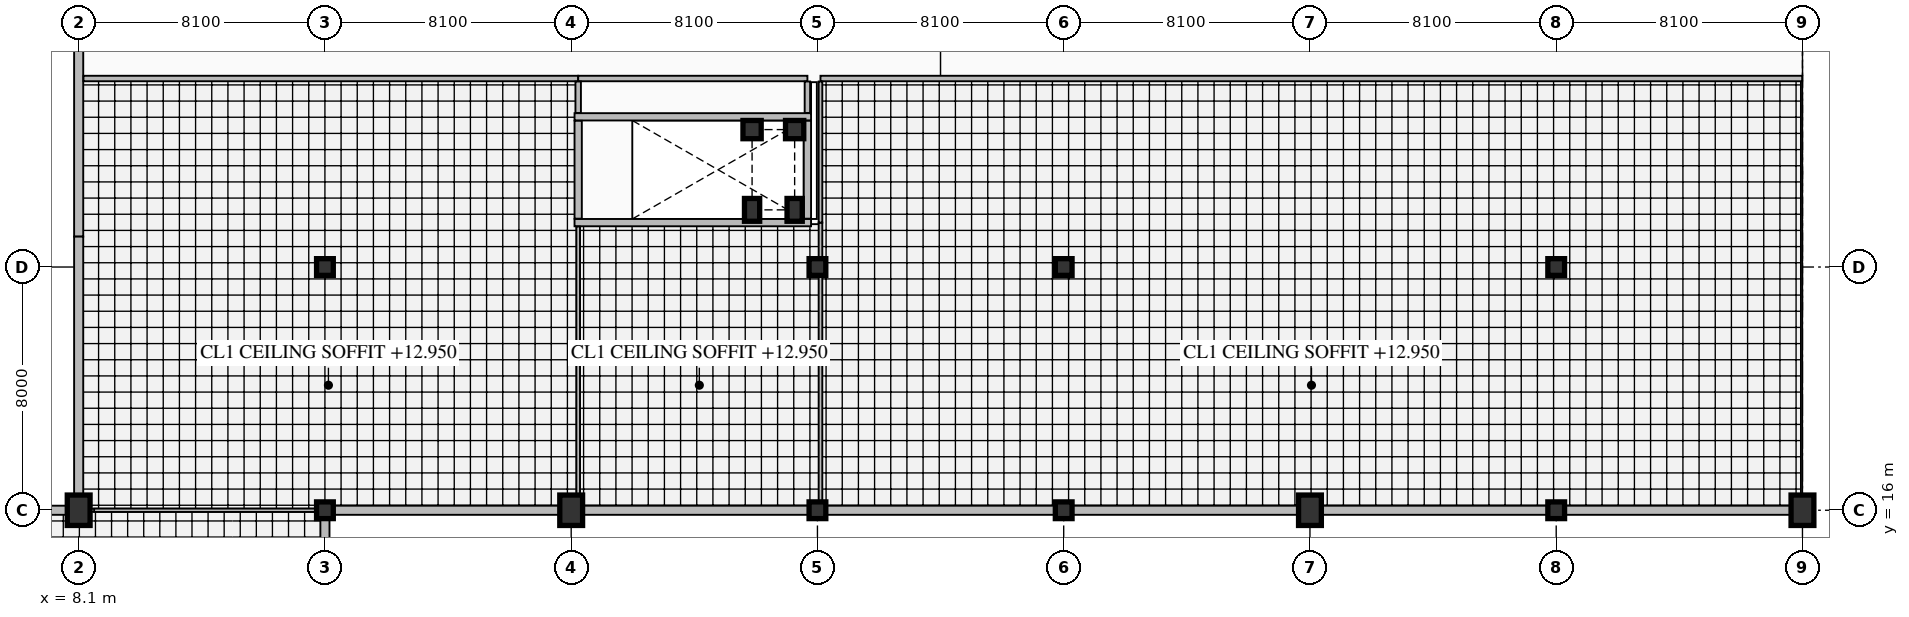
"""IFC4 building model, lengths in metres.
Left out: names, types, materials, properties, quantities, classifications, styles, units other than length and angle.
Written with IfcOpenShell. Run it as: python <this file> out.ifc"""

import sys

from ifc_helpers import new_model, si_unit, direction, frame, frame_2d, origin, origin_2d, place, context, subcontext, project, spatial, rectangle, extrude, element, fill, save


model = new_model("IFC4")
c1 = context("Model", 3, precision=1e-05, world=origin(), true_north=direction((0.0, 1.0)))
c2 = subcontext(c1, "Body", "Model", "MODEL_VIEW")
j1 = project(units=[si_unit("LENGTHUNIT", "METRE"), si_unit("PLANEANGLEUNIT", "RADIAN")], contexts=[c1])
p1 = place(None, origin())
s1 = spatial("IfcSite", under=j1, at=p1, CompositionType="ELEMENT")
p2 = place(p1, origin())
s2 = spatial("IfcBuilding", under=s1, at=p2, CompositionType="ELEMENT")
p3 = place(p2, frame((0.0, 0.0, 10.2)))
s3 = spatial("IfcBuildingStorey", under=s2, at=p3, CompositionType="ELEMENT", Elevation=10.2)
p4 = place(p3, frame((8.1, 16.0, 0.0), z_axis=(0.0, 0.0, 1.0), x_axis=(1.0, 0.0, 0.0)))
e1 = element("IfcColumn", 1, at=p4, inside=s3, PredefinedType="COLUMN", context=c2, shape_type="SweptSolid", body=[
    extrude(rectangle(XDim=0.75, YDim=1.0, at=origin_2d()), origin(), (0.0, 0.0, 1.0), 4.5),
])
for number, where, z_axis, x_axis in (
    (2, (16.2, 16.0, 0.0), (0.0, 0.0, 1.0), (1.0, 0.0, 0.0)),
    (3, (16.2, 24.0, 0.0), (0.0, 0.0, 1.0), (1.0, 0.0, 0.0)),
):
    element("IfcColumn", number, at=place(p3, frame(where, z_axis=z_axis, x_axis=x_axis)), inside=s3, PredefinedType="COLUMN", context=c2, shape_type="SweptSolid", body=[
        extrude(rectangle(XDim=0.55, YDim=0.55, at=origin_2d()), origin(), (0.0, 0.0, 1.0), 4.24),
    ])
p5 = place(p3, frame((24.3, 16.0, 0.0), z_axis=(0.0, 0.0, 1.0), x_axis=(1.0, 0.0, 0.0)))
e4 = element("IfcColumn", 4, at=p5, inside=s3, PredefinedType="COLUMN", context=c2, shape_type="SweptSolid", body=[
    extrude(rectangle(XDim=0.75, YDim=1.0, at=origin_2d()), origin(), (0.0, 0.0, 1.0), 4.5),
])
p6 = place(p3, frame((30.25, 25.88, 0.0), z_axis=(0.0, 0.0, 1.0), x_axis=(1.0, 0.0, 0.0)))
e5 = element("IfcColumn", 5, at=p6, inside=s3, PredefinedType="COLUMN", context=c2, shape_type="SweptSolid", body=[
    extrude(rectangle(XDim=0.5, YDim=0.75, at=origin_2d()), origin(), (0.0, 0.0, 1.0), 4.5),
])
p7 = place(p3, frame((30.25, 28.52, 0.0), z_axis=(0.0, 0.0, 1.0), x_axis=(1.0, 0.0, 0.0)))
e6 = element("IfcColumn", 6, at=p7, inside=s3, PredefinedType="COLUMN", context=c2, shape_type="SweptSolid", body=[
    extrude(rectangle(XDim=0.6, YDim=0.6, at=origin_2d()), origin(), (0.0, 0.0, 1.0), 4.5),
])
p8 = place(p3, frame((31.65, 25.88, 0.0), z_axis=(0.0, 0.0, 1.0), x_axis=(1.0, 0.0, 0.0)))
e7 = element("IfcColumn", 7, at=p8, inside=s3, PredefinedType="COLUMN", context=c2, shape_type="SweptSolid", body=[
    extrude(rectangle(XDim=0.5, YDim=0.75, at=origin_2d()), origin(), (0.0, 0.0, 1.0), 4.5),
])
p9 = place(p3, frame((31.65, 28.52, 0.0), z_axis=(0.0, 0.0, 1.0), x_axis=(1.0, 0.0, 0.0)))
e8 = element("IfcColumn", 8, at=p9, inside=s3, PredefinedType="COLUMN", context=c2, shape_type="SweptSolid", body=[
    extrude(rectangle(XDim=0.6, YDim=0.6, at=origin_2d()), origin(), (0.0, 0.0, 1.0), 4.5),
])
for number, where, z_axis, x_axis in (
    (9, (32.4, 16.0, 0.0), (0.0, 0.0, 1.0), (1.0, 0.0, 0.0)),
    (10, (32.4, 24.0, 0.0), (0.0, 0.0, 1.0), (1.0, 0.0, 0.0)),
    (11, (40.5, 16.0, 0.0), (0.0, 0.0, 1.0), (1.0, 0.0, 0.0)),
    (12, (40.5, 24.0, 0.0), (0.0, 0.0, 1.0), (1.0, 0.0, 0.0)),
):
    element("IfcColumn", number, at=place(p3, frame(where, z_axis=z_axis, x_axis=x_axis)), inside=s3, PredefinedType="COLUMN", context=c2, shape_type="SweptSolid", body=[
        extrude(rectangle(XDim=0.55, YDim=0.55, at=origin_2d()), origin(), (0.0, 0.0, 1.0), 4.24),
    ])
p10 = place(p3, frame((48.6, 16.0, 0.0), z_axis=(0.0, 0.0, 1.0), x_axis=(1.0, 0.0, 0.0)))
e13 = element("IfcColumn", 13, at=p10, inside=s3, PredefinedType="COLUMN", context=c2, shape_type="SweptSolid", body=[
    extrude(rectangle(XDim=0.75, YDim=1.0, at=origin_2d()), origin(), (0.0, 0.0, 1.0), 4.5),
])
for number, where, z_axis, x_axis in (
    (14, (56.7, 16.0, 0.0), (0.0, 0.0, 1.0), (1.0, 0.0, 0.0)),
    (15, (56.7, 24.0, 0.0), (0.0, 0.0, 1.0), (1.0, 0.0, 0.0)),
):
    element("IfcColumn", number, at=place(p3, frame(where, z_axis=z_axis, x_axis=x_axis)), inside=s3, PredefinedType="COLUMN", context=c2, shape_type="SweptSolid", body=[
        extrude(rectangle(XDim=0.55, YDim=0.55, at=origin_2d()), origin(), (0.0, 0.0, 1.0), 4.24),
    ])
p11 = place(p3, frame((64.8, 16.0, 0.0), z_axis=(0.0, 0.0, 1.0), x_axis=(1.0, 0.0, 0.0)))
e16 = element("IfcColumn", 16, at=p11, inside=s3, PredefinedType="COLUMN", context=c2, shape_type="SweptSolid", body=[
    extrude(rectangle(XDim=0.75, YDim=1.0, at=origin_2d()), origin(), (0.0, 0.0, 1.0), 4.5),
])
p12 = place(p3, frame((16.2, 0.0, 0.0), z_axis=(0.0, 0.0, 1.0), x_axis=(0.0, 1.0, 0.0)))
e17 = element("IfcWall", 17, at=p12, inside=s3, PredefinedType="SOLIDWALL", context=c2, shape_type="SweptSolid", body=[
    extrude(rectangle(XDim=16.0, YDim=0.3, at=frame_2d((8.0, 0.0))), origin(), (0.0, 0.0, 1.0), 3.769),
])
p13 = place(p3, frame((16.2, 16.0, 0.0), z_axis=(0.0, 0.0, 1.0), x_axis=(1.0, 0.0, 0.0)))
e18 = element("IfcWall", 18, at=p13, inside=s3, PredefinedType="SOLIDWALL", context=c2, shape_type="SweptSolid", body=[
    extrude(rectangle(XDim=16.2, YDim=0.3, at=frame_2d((8.1, 0.0))), origin(), (0.0, 0.0, 1.0), 3.544),
])
p14 = place(p3, frame((32.4, 16.0, 0.0), z_axis=(0.0, 0.0, 1.0), x_axis=(1.0, 0.0, 0.0)))
e19 = element("IfcWall", 19, at=p14, inside=s3, PredefinedType="SOLIDWALL", context=c2, shape_type="SweptSolid", body=[
    extrude(rectangle(XDim=16.2, YDim=0.3, at=frame_2d((8.1, 0.0))), origin(), (0.0, 0.0, 1.0), 3.544),
])
p15 = place(p3, frame((48.6, 16.0, 0.0), z_axis=(0.0, 0.0, 1.0), x_axis=(1.0, 0.0, 0.0)))
e20 = element("IfcWall", 20, at=p15, inside=s3, PredefinedType="SOLIDWALL", context=c2, shape_type="SweptSolid", body=[
    extrude(rectangle(XDim=16.2, YDim=0.3, at=frame_2d((8.1, 0.0))), origin(), (0.0, 0.0, 1.0), 3.62),
])
p16 = place(p3, frame((8.1, 34.0, 0.0), z_axis=(0.0, 0.0, 1.0), x_axis=(0.0, -1.0, 0.0)))
e21 = element("IfcWall", 21, at=p16, inside=s3, PredefinedType="SOLIDWALL", context=c2, shape_type="SweptSolid", body=[
    extrude(rectangle(XDim=9.0, YDim=0.3, at=frame_2d((4.5, 0.0))), origin(), (0.0, 0.0, 1.0), 3.366),
])
p17 = place(p16, frame((4.95, 0.0, 0.95)))
e22 = element("IfcOpeningElement", 22, at=p17, cuts=e21, PredefinedType="OPENING", context=c2, shape_type="SweptSolid", body=[
    extrude(rectangle(XDim=2.1, YDim=1.8, at=frame_2d((1.05, 0.9))), frame((0.0, 0.16, 0.0), z_axis=(0.0, -1.0, 0.0), x_axis=(1.0, 0.0, 0.0)), (0.0, 0.0, 1.0), 0.32),
])
p18 = place(p3, frame((8.1, 25.0, 0.0), z_axis=(0.0, 0.0, 1.0), x_axis=(0.0, -1.0, 0.0)))
e23 = element("IfcWall", 23, at=p18, inside=s3, PredefinedType="SOLIDWALL", context=c2, shape_type="SweptSolid", body=[
    extrude(rectangle(XDim=9.0, YDim=0.3, at=frame_2d((4.5, 0.0))), origin(), (0.0, 0.0, 1.0), 3.366),
])
p19 = place(p18, frame((3.6, 0.0, 0.95)))
e24 = element("IfcOpeningElement", 24, at=p19, cuts=e23, PredefinedType="OPENING", context=c2, shape_type="SweptSolid", body=[
    extrude(rectangle(XDim=2.25, YDim=1.8, at=frame_2d((1.125, 0.9))), frame((0.0, 0.16, 0.0), z_axis=(0.0, -1.0, 0.0), x_axis=(1.0, 0.0, 0.0)), (0.0, 0.0, 1.0), 0.32),
])
p20 = place(p3, frame((8.1, 16.0, 0.0), z_axis=(0.0, 0.0, 1.0), x_axis=(-1.0, 0.0, 0.0)))
e25 = element("IfcWall", 25, at=p20, inside=s3, PredefinedType="SOLIDWALL", context=c2, shape_type="SweptSolid", body=[
    extrude(rectangle(XDim=8.1, YDim=0.3, at=frame_2d((4.05, 0.0))), origin(), (0.0, 0.0, 1.0), 3.619),
])
p21 = place(p20, frame((2.7, 0.0, 0.95)))
e26 = element("IfcOpeningElement", 26, at=p21, cuts=e25, PredefinedType="OPENING", context=c2, shape_type="SweptSolid", body=[
    extrude(rectangle(XDim=2.4, YDim=1.6, at=frame_2d((1.2, 0.8))), frame((0.0, 0.16, 0.0), z_axis=(0.0, -1.0, 0.0), x_axis=(1.0, 0.0, 0.0)), (0.0, 0.0, 1.0), 0.32),
])
p22 = place(p3, frame((24.41, 25.46, 0.0), z_axis=(0.0, 0.0, 1.0), x_axis=(1.0, 0.0, 0.0)))
e27 = element("IfcWall", 27, at=p22, inside=s3, PredefinedType="PARTITIONING", context=c2, shape_type="SweptSolid", body=[
    extrude(rectangle(XDim=7.78, YDim=0.24, at=frame_2d((3.89, 0.0))), origin(), (0.0, 0.0, 1.0), 4.24),
])
p23 = place(p3, frame((24.41, 28.94, 0.0), z_axis=(0.0, 0.0, 1.0), x_axis=(1.0, 0.0, 0.0)))
e28 = element("IfcWall", 28, at=p23, inside=s3, PredefinedType="PARTITIONING", context=c2, shape_type="SweptSolid", body=[
    extrude(rectangle(XDim=7.78, YDim=0.24, at=frame_2d((3.89, 0.0))), origin(), (0.0, 0.0, 1.0), 4.24),
])
p24 = place(p23, frame((0.54, 0.0, 0.0)))
e29 = element("IfcOpeningElement", 29, at=p24, cuts=e28, PredefinedType="OPENING", context=c2, shape_type="SweptSolid", body=[
    extrude(rectangle(XDim=1.1, YDim=2.2, at=frame_2d((0.55, 1.1))), frame((0.0, 0.13, 0.0), z_axis=(0.0, -1.0, 0.0), x_axis=(1.0, 0.0, 0.0)), (0.0, 0.0, 1.0), 0.26),
])
p25 = place(p3, frame((24.53, 25.59, 0.0), z_axis=(0.0, 0.0, 1.0), x_axis=(0.0, 1.0, 0.0)))
e30 = element("IfcWall", 30, at=p25, inside=s3, PredefinedType="PARTITIONING", context=c2, shape_type="SweptSolid", body=[
    extrude(rectangle(XDim=3.22, YDim=0.24, at=frame_2d((1.61, 0.0))), origin(), (0.0, 0.0, 1.0), 3.366),
])
p26 = place(p3, frame((32.07, 25.59, 0.0), z_axis=(0.0, 0.0, 1.0), x_axis=(0.0, 1.0, 0.0)))
e31 = element("IfcWall", 31, at=p26, inside=s3, PredefinedType="PARTITIONING", context=c2, shape_type="SweptSolid", body=[
    extrude(rectangle(XDim=3.22, YDim=0.24, at=frame_2d((1.61, 0.0))), origin(), (0.0, 0.0, 1.0), 4.24),
])
p27 = place(p3, frame((8.608, 16.0, 0.0), z_axis=(0.0, 0.0, 1.0), x_axis=(1.0, 0.0, 0.0)))
e32 = element("IfcWall", 32, at=p27, inside=s3, PredefinedType="PARTITIONING", context=c2, shape_type="SweptSolid", body=[
    extrude(rectangle(XDim=7.309, YDim=0.11, at=frame_2d((3.655, 0.0))), origin(), (0.0, 0.0, 1.0), 3.62),
])
p28 = place(p27, frame((3.179, 0.0, 0.0)))
e33 = element("IfcOpeningElement", 33, at=p28, cuts=e32, PredefinedType="OPENING", context=c2, shape_type="SweptSolid", body=[
    extrude(rectangle(XDim=0.95, YDim=2.15, at=frame_2d((0.475, 1.075))), frame((0.0, 0.065, 0.0), z_axis=(0.0, -1.0, 0.0), x_axis=(1.0, 0.0, 0.0)), (0.0, 0.0, 1.0), 0.13),
])
p29 = place(p3, frame((8.258, 30.2, 0.0), z_axis=(0.0, 0.0, 1.0), x_axis=(1.0, 0.0, 0.0)))
e34 = element("IfcWall", 34, at=p29, inside=s3, PredefinedType="PARTITIONING", context=c2, shape_type="SweptSolid", body=[
    extrude(rectangle(XDim=16.272, YDim=0.18, at=frame_2d((8.136, 0.0))), origin(), (0.0, 0.0, 1.0), 4.24),
])
p30 = place(p29, frame((6.334, 0.0, 0.0)))
e35 = element("IfcOpeningElement", 35, at=p30, cuts=e34, PredefinedType="OPENING", context=c2, shape_type="SweptSolid", body=[
    extrude(rectangle(XDim=1.0, YDim=2.2, at=frame_2d((0.5, 1.1))), frame((0.0, 0.1, 0.0), z_axis=(0.0, -1.0, 0.0), x_axis=(1.0, 0.0, 0.0)), (0.0, 0.0, 1.0), 0.2),
])
p31 = place(p3, frame((24.53, 30.2, 0.0), z_axis=(0.0, 0.0, 1.0), x_axis=(1.0, 0.0, 0.0)))
e36 = element("IfcWall", 36, at=p31, inside=s3, PredefinedType="PARTITIONING", context=c2, shape_type="SweptSolid", body=[
    extrude(rectangle(XDim=7.54, YDim=0.18, at=frame_2d((3.77, 0.0))), origin(), (0.0, 0.0, 1.0), 4.24),
])
p32 = place(p31, frame((3.22, 0.0, 0.0)))
e37 = element("IfcOpeningElement", 37, at=p32, cuts=e36, PredefinedType="OPENING", context=c2, shape_type="SweptSolid", body=[
    extrude(rectangle(XDim=1.1, YDim=2.2, at=frame_2d((0.55, 1.1))), frame((0.0, 0.1, 0.0), z_axis=(0.0, -1.0, 0.0), x_axis=(1.0, 0.0, 0.0)), (0.0, 0.0, 1.0), 0.2),
])
p33 = place(p3, frame((32.5, 30.2, 0.0), z_axis=(0.0, 0.0, 1.0), x_axis=(1.0, 0.0, 0.0)))
e38 = element("IfcWall", 38, at=p33, inside=s3, PredefinedType="PARTITIONING", context=c2, shape_type="SweptSolid", body=[
    extrude(rectangle(XDim=32.29, YDim=0.18, at=frame_2d((16.145, 0.0))), origin(), (0.0, 0.0, 1.0), 4.24),
])
p34 = place(p33, frame((15.595, 0.0, 0.0)))
e39 = element("IfcOpeningElement", 39, at=p34, cuts=e38, PredefinedType="OPENING", context=c2, shape_type="SweptSolid", body=[
    extrude(rectangle(XDim=1.1, YDim=2.2, at=frame_2d((0.55, 1.1))), frame((0.0, 0.1, 0.0), z_axis=(0.0, -1.0, 0.0), x_axis=(1.0, 0.0, 0.0)), (0.0, 0.0, 1.0), 0.2),
])
p35 = place(p3, frame((24.53, 16.508, 0.0), z_axis=(0.0, 0.0, 1.0), x_axis=(0.0, 1.0, 0.0)))
e40 = element("IfcWall", 40, at=p35, inside=s3, PredefinedType="PARTITIONING", context=c2, shape_type="SweptSolid", body=[
    extrude(rectangle(XDim=8.824, YDim=0.12, at=frame_2d((4.412, 0.0))), origin(), (0.0, 0.0, 1.0), 3.366),
])
p36 = place(p3, frame((24.53, 29.068, 0.0), z_axis=(0.0, 0.0, 1.0), x_axis=(0.0, 1.0, 0.0)))
e41 = element("IfcWall", 41, at=p36, inside=s3, PredefinedType="PARTITIONING", context=c2, shape_type="SweptSolid", body=[
    extrude(rectangle(XDim=1.034, YDim=0.18, at=frame_2d((0.517, 0.0))), origin(), (0.0, 0.0, 1.0), 3.366),
])
p37 = place(p3, frame((32.07, 29.068, 0.0), z_axis=(0.0, 0.0, 1.0), x_axis=(0.0, 1.0, 0.0)))
e42 = element("IfcWall", 42, at=p37, inside=s3, PredefinedType="PARTITIONING", context=c2, shape_type="SweptSolid", body=[
    extrude(rectangle(XDim=1.034, YDim=0.18, at=frame_2d((0.517, 0.0))), origin(), (0.0, 0.0, 1.0), 4.24),
])
p38 = place(p3, frame((32.5, 16.283, 0.0), z_axis=(0.0, 0.0, 1.0), x_axis=(0.0, 1.0, 0.0)))
e43 = element("IfcWall", 43, at=p38, inside=s3, PredefinedType="PARTITIONING", context=c2, shape_type="SweptSolid", body=[
    extrude(rectangle(XDim=7.434, YDim=0.12, at=frame_2d((3.717, 0.0))), origin(), (0.0, 0.0, 1.0), 3.769),
])
p39 = place(p38, frame((3.217, 0.0, 0.0)))
e44 = element("IfcOpeningElement", 44, at=p39, cuts=e43, PredefinedType="OPENING", context=c2, shape_type="SweptSolid", body=[
    extrude(rectangle(XDim=1.0, YDim=2.2, at=frame_2d((0.5, 1.1))), frame((0.0, 0.07, 0.0), z_axis=(0.0, -1.0, 0.0), x_axis=(1.0, 0.0, 0.0)), (0.0, 0.0, 1.0), 0.14),
])
p40 = place(p3, frame((32.5, 24.283, 0.0), z_axis=(0.0, 0.0, 1.0), x_axis=(0.0, 1.0, 0.0)))
e45 = element("IfcWall", 45, at=p40, inside=s3, PredefinedType="PARTITIONING", context=c2, shape_type="SweptSolid", body=[
    extrude(rectangle(XDim=1.177, YDim=0.12, at=frame_2d((0.588, 0.0))), origin(), (0.0, 0.0, 1.0), 3.769),
])
p41 = place(p3, frame((32.5, 25.46, 0.0), z_axis=(0.0, 0.0, 1.0), x_axis=(0.0, 1.0, 0.0)))
e46 = element("IfcWall", 46, at=p41, inside=s3, PredefinedType="PARTITIONING", context=c2, shape_type="SweptSolid", body=[
    extrude(rectangle(XDim=4.642, YDim=0.12, at=frame_2d((2.321, 0.0))), origin(), (0.0, 0.0, 1.0), 3.769),
])
p42 = place(p17, origin())
e47 = element("IfcWindow", 47, at=p42, inside=s3, PartitioningType="DOUBLE_PANEL_VERTICAL", PredefinedType="WINDOW", context=c2, shape_type="SweptSolid", body=[
    extrude(rectangle(XDim=2.1, YDim=1.8, at=frame_2d((1.05, 0.9))), frame((0.0, 0.03, 0.0), z_axis=(0.0, -1.0, 0.0), x_axis=(1.0, 0.0, 0.0)), (0.0, 0.0, 1.0), 0.06),
])
fill(e22, e47)
p43 = place(p19, origin())
e48 = element("IfcWindow", 48, at=p43, inside=s3, PartitioningType="TRIPLE_PANEL_VERTICAL", PredefinedType="WINDOW", context=c2, shape_type="SweptSolid", body=[
    extrude(rectangle(XDim=2.25, YDim=1.8, at=frame_2d((1.125, 0.9))), frame((0.0, 0.03, 0.0), z_axis=(0.0, -1.0, 0.0), x_axis=(1.0, 0.0, 0.0)), (0.0, 0.0, 1.0), 0.06),
])
fill(e24, e48)
p44 = place(p24, frame((1.1, 0.0, 0.0), z_axis=(0.0, 0.0, 1.0), x_axis=(-1.0, 0.0, 0.0)))
e49 = element("IfcDoor", 49, at=p44, inside=s3, OperationType="SINGLE_SWING_RIGHT", PredefinedType="DOOR", context=c2, shape_type="SweptSolid", body=[
    extrude(rectangle(XDim=1.1, YDim=2.2, at=frame_2d((0.55, 1.1))), frame((0.0, 0.025, 0.0), z_axis=(0.0, -1.0, 0.0), x_axis=(1.0, 0.0, 0.0)), (0.0, 0.0, 1.0), 0.05),
])
fill(e29, e49)
p45 = place(p28, frame((0.95, 0.0, 0.0), z_axis=(0.0, 0.0, 1.0), x_axis=(-1.0, 0.0, 0.0)))
e50 = element("IfcDoor", 50, at=p45, inside=s3, OperationType="SINGLE_SWING_RIGHT", PredefinedType="DOOR", context=c2, shape_type="SweptSolid", body=[
    extrude(rectangle(XDim=0.95, YDim=2.15, at=frame_2d((0.475, 1.075))), frame((0.0, 0.025, 0.0), z_axis=(0.0, -1.0, 0.0), x_axis=(1.0, 0.0, 0.0)), (0.0, 0.0, 1.0), 0.05),
])
fill(e33, e50)
p46 = place(p30, frame((1.0, 0.0, 0.0), z_axis=(0.0, 0.0, 1.0), x_axis=(-1.0, 0.0, 0.0)))
e51 = element("IfcDoor", 51, at=p46, inside=s3, OperationType="SINGLE_SWING_LEFT", PredefinedType="DOOR", context=c2, shape_type="SweptSolid", body=[
    extrude(rectangle(XDim=1.0, YDim=2.2, at=frame_2d((0.5, 1.1))), frame((0.0, 0.025, 0.0), z_axis=(0.0, -1.0, 0.0), x_axis=(1.0, 0.0, 0.0)), (0.0, 0.0, 1.0), 0.05),
])
fill(e35, e51)
p47 = place(p32, origin())
e52 = element("IfcDoor", 52, at=p47, inside=s3, OperationType="SINGLE_SWING_RIGHT", PredefinedType="DOOR", context=c2, shape_type="SweptSolid", body=[
    extrude(rectangle(XDim=1.1, YDim=2.2, at=frame_2d((0.55, 1.1))), frame((0.0, 0.025, 0.0), z_axis=(0.0, -1.0, 0.0), x_axis=(1.0, 0.0, 0.0)), (0.0, 0.0, 1.0), 0.05),
])
fill(e37, e52)
p48 = place(p34, frame((1.1, 0.0, 0.0), z_axis=(0.0, 0.0, 1.0), x_axis=(-1.0, 0.0, 0.0)))
e53 = element("IfcDoor", 53, at=p48, inside=s3, OperationType="SINGLE_SWING_RIGHT", PredefinedType="DOOR", context=c2, shape_type="SweptSolid", body=[
    extrude(rectangle(XDim=1.1, YDim=2.2, at=frame_2d((0.55, 1.1))), frame((0.0, 0.025, 0.0), z_axis=(0.0, -1.0, 0.0), x_axis=(1.0, 0.0, 0.0)), (0.0, 0.0, 1.0), 0.05),
])
fill(e39, e53)
p49 = place(p39, origin())
e54 = element("IfcDoor", 54, at=p49, inside=s3, OperationType="SINGLE_SWING_RIGHT", PredefinedType="DOOR", context=c2, shape_type="SweptSolid", body=[
    extrude(rectangle(XDim=1.0, YDim=2.2, at=frame_2d((0.5, 1.1))), frame((0.0, 0.025, 0.0), z_axis=(0.0, -1.0, 0.0), x_axis=(1.0, 0.0, 0.0)), (0.0, 0.0, 1.0), 0.05),
])
fill(e44, e54)
save(model, sys.argv[1])
